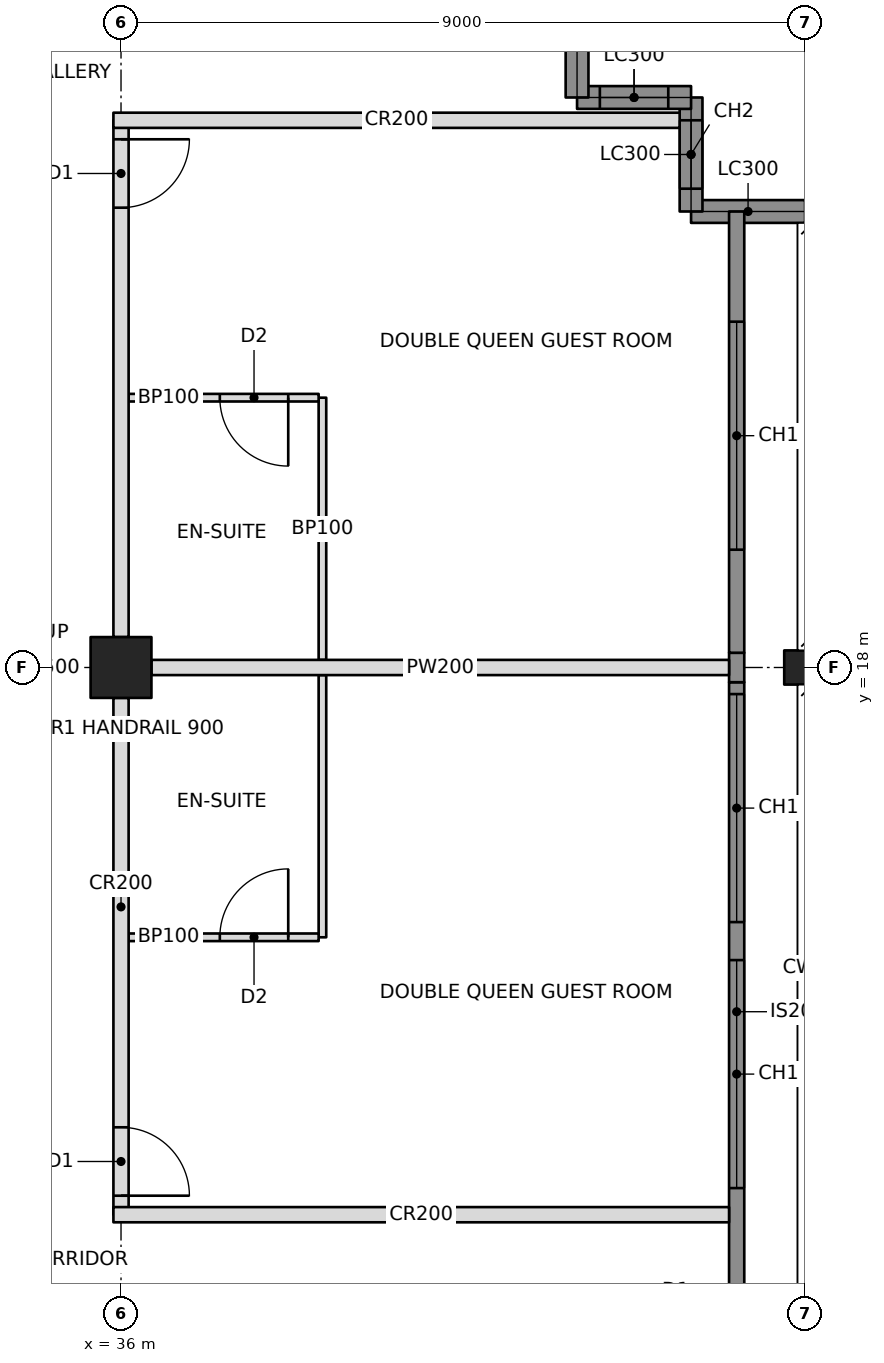
"""IFC4 building model, lengths in metres.
Left out: names, types, materials, properties, quantities, classifications, styles, units other than length and angle.
Written with IfcOpenShell. Run it as: python <this file> out.ifc"""

import sys

from ifc_helpers import new_model, si_unit, direction, frame, frame_2d, origin, origin_2d, place, context, subcontext, project, spatial, rectangle, hollow_rectangle, i_section, extrude, element, fill, save


model = new_model("IFC4")
c1 = context("Model", 3, precision=1e-05, world=origin(), true_north=direction((0.0, 1.0)))
c2 = subcontext(c1, "Body", "Model", "MODEL_VIEW")
j1 = project(units=[si_unit("LENGTHUNIT", "METRE"), si_unit("PLANEANGLEUNIT", "RADIAN")], contexts=[c1])
p1 = place(None, origin())
s1 = spatial("IfcSite", under=j1, at=p1, CompositionType="ELEMENT")
p2 = place(p1, origin())
s2 = spatial("IfcBuilding", under=s1, at=p2, CompositionType="ELEMENT")
p3 = place(p2, frame((0.0, 0.0, 184.2)))
s3 = spatial("IfcBuildingStorey", under=s2, at=p3, CompositionType="ELEMENT", Elevation=184.2)
p4 = place(p3, frame((36.0, 18.0, 0.0), z_axis=(0.0, 0.0, 1.0), x_axis=(0.0, 1.0, 0.0)))
e1 = element("IfcColumn", 1, at=p4, inside=s3, PredefinedType="COLUMN", context=c2, shape_type="SweptSolid", body=[
    extrude(hollow_rectangle(XDim=0.8, YDim=0.8, WallThickness=0.06, at=origin_2d()), origin(), (0.0, 0.0, 1.0), 3.4),
])
p5 = place(p3, frame((45.0, 18.0, 0.0), z_axis=(0.0, 0.0, 1.0), x_axis=(0.0, 1.0, 0.0)))
e2 = element("IfcColumn", 2, at=p5, inside=s3, PredefinedType="COLUMN", context=c2, shape_type="SweptSolid", body=[
    extrude(i_section(OverallWidth=0.449, OverallDepth=0.549, WebThickness=0.072, FlangeThickness=0.115, at=origin_2d()), origin(), (0.0, 0.0, 1.0), 3.4),
])
p6 = place(p3, frame((45.0, 24.0, 0.0), z_axis=(0.0, 0.0, 1.0), x_axis=(-1.0, 0.0, 0.0)))
e3 = element("IfcWall", 3, at=p6, inside=s3, PredefinedType="SOLIDWALL", context=c2, shape_type="SweptSolid", body=[
    extrude(rectangle(XDim=1.5, YDim=0.3, at=frame_2d((0.75, 0.0))), origin(), (0.0, 0.0, 1.0), 2.42),
])
p7 = place(p3, frame((43.5, 24.0, 0.0), z_axis=(0.0, 0.0, 1.0), x_axis=(0.0, 1.0, 0.0)))
e4 = element("IfcWall", 4, at=p7, inside=s3, PredefinedType="SOLIDWALL", context=c2, shape_type="SweptSolid", body=[
    extrude(rectangle(XDim=1.5, YDim=0.3, at=frame_2d((0.75, 0.0))), origin(), (0.0, 0.0, 1.0), 3.2),
])
p8 = place(p7, frame((0.3, 0.0, 0.6)))
e5 = element("IfcOpeningElement", 5, at=p8, cuts=e4, PredefinedType="OPENING", context=c2, shape_type="SweptSolid", body=[
    extrude(rectangle(XDim=0.9, YDim=2.2, at=frame_2d((0.45, 1.1))), frame((0.0, 0.16, 0.0), z_axis=(0.0, -1.0, 0.0), x_axis=(1.0, 0.0, 0.0)), (0.0, 0.0, 1.0), 0.32),
])
p9 = place(p3, frame((43.5, 25.5, 0.0), z_axis=(0.0, 0.0, 1.0), x_axis=(-1.0, 0.0, 0.0)))
e6 = element("IfcWall", 6, at=p9, inside=s3, PredefinedType="SOLIDWALL", context=c2, shape_type="SweptSolid", body=[
    extrude(rectangle(XDim=1.5, YDim=0.3, at=frame_2d((0.75, 0.0))), origin(), (0.0, 0.0, 1.0), 3.2),
])
p10 = place(p9, frame((0.3, 0.0, 0.6)))
e7 = element("IfcOpeningElement", 7, at=p10, cuts=e6, PredefinedType="OPENING", context=c2, shape_type="SweptSolid", body=[
    extrude(rectangle(XDim=0.9, YDim=2.2, at=frame_2d((0.45, 1.1))), frame((0.0, 0.16, 0.0), z_axis=(0.0, -1.0, 0.0), x_axis=(1.0, 0.0, 0.0)), (0.0, 0.0, 1.0), 0.32),
])
p11 = place(p3, frame((42.0, 25.5, 0.0), z_axis=(0.0, 0.0, 1.0), x_axis=(0.0, 1.0, 0.0)))
e8 = element("IfcWall", 8, at=p11, inside=s3, PredefinedType="SOLIDWALL", context=c2, shape_type="SweptSolid", body=[
    extrude(rectangle(XDim=1.5, YDim=0.3, at=frame_2d((0.75, 0.0))), origin(), (0.0, 0.0, 1.0), 2.42),
])
p12 = place(p3, frame((36.0, 10.8, 0.0), z_axis=(0.0, 0.0, 1.0), x_axis=(0.0, 1.0, 0.0)))
e9 = element("IfcWall", 9, at=p12, inside=s3, PredefinedType="PARTITIONING", context=c2, shape_type="SweptSolid", body=[
    extrude(rectangle(XDim=6.8, YDim=0.2, at=frame_2d((3.4, 0.0))), origin(), (0.0, 0.0, 1.0), 2.405),
])
p13 = place(p12, frame((0.25, 0.0, 0.0)))
e10 = element("IfcOpeningElement", 10, at=p13, cuts=e9, PredefinedType="OPENING", context=c2, shape_type="SweptSolid", body=[
    extrude(rectangle(XDim=0.9, YDim=2.1, at=frame_2d((0.45, 1.05))), frame((0.0, 0.11, 0.0), z_axis=(0.0, -1.0, 0.0), x_axis=(1.0, 0.0, 0.0)), (0.0, 0.0, 1.0), 0.22),
])
p14 = place(p3, frame((36.0, 18.4, 0.0), z_axis=(0.0, 0.0, 1.0), x_axis=(0.0, 1.0, 0.0)))
e11 = element("IfcWall", 11, at=p14, inside=s3, PredefinedType="PARTITIONING", context=c2, shape_type="SweptSolid", body=[
    extrude(rectangle(XDim=6.8, YDim=0.2, at=frame_2d((3.4, 0.0))), origin(), (0.0, 0.0, 1.0), 2.405),
])
p15 = place(p14, frame((5.65, 0.0, 0.0)))
e12 = element("IfcOpeningElement", 12, at=p15, cuts=e11, PredefinedType="OPENING", context=c2, shape_type="SweptSolid", body=[
    extrude(rectangle(XDim=0.9, YDim=2.1, at=frame_2d((0.45, 1.05))), frame((0.0, 0.11, 0.0), z_axis=(0.0, -1.0, 0.0), x_axis=(1.0, 0.0, 0.0)), (0.0, 0.0, 1.0), 0.22),
])
p16 = place(p3, frame((35.9, 10.8, 0.0), z_axis=(0.0, 0.0, 1.0), x_axis=(1.0, 0.0, 0.0)))
e13 = element("IfcWall", 13, at=p16, inside=s3, PredefinedType="PARTITIONING", context=c2, shape_type="SweptSolid", body=[
    extrude(rectangle(XDim=8.1, YDim=0.2, at=frame_2d((4.05, 0.0))), origin(), (0.0, 0.0, 1.0), 2.404),
])
p17 = place(p3, frame((35.9, 25.2, 0.0), z_axis=(0.0, 0.0, 1.0), x_axis=(1.0, 0.0, 0.0)))
e14 = element("IfcWall", 14, at=p17, inside=s3, PredefinedType="PARTITIONING", context=c2, shape_type="SweptSolid", body=[
    extrude(rectangle(XDim=7.45, YDim=0.2, at=frame_2d((3.725, 0.0))), origin(), (0.0, 0.0, 1.0), 2.404),
])
p18 = place(p3, frame((36.4, 18.0, 0.0), z_axis=(0.0, 0.0, 1.0), x_axis=(1.0, 0.0, 0.0)))
e15 = element("IfcWall", 15, at=p18, inside=s3, PredefinedType="PARTITIONING", context=c2, shape_type="SweptSolid", body=[
    extrude(rectangle(XDim=7.6, YDim=0.2, at=frame_2d((3.8, 0.0))), origin(), (0.0, 0.0, 1.0), 2.405),
])
p19 = place(p3, frame((38.65, 14.45, 0.0), z_axis=(0.0, 0.0, 1.0), x_axis=(0.0, 1.0, 0.0)))
e16 = element("IfcWall", 16, at=p19, inside=s3, PredefinedType="PARTITIONING", context=c2, shape_type="SweptSolid", body=[
    extrude(rectangle(XDim=3.45, YDim=0.1, at=frame_2d((1.725, 0.0))), origin(), (0.0, 0.0, 1.0), 2.404),
])
p20 = place(p3, frame((36.1, 14.45, 0.0), z_axis=(0.0, 0.0, 1.0), x_axis=(1.0, 0.0, 0.0)))
e17 = element("IfcWall", 17, at=p20, inside=s3, PredefinedType="PARTITIONING", context=c2, shape_type="SweptSolid", body=[
    extrude(rectangle(XDim=2.5, YDim=0.1, at=frame_2d((1.25, 0.0))), origin(), (0.0, 0.0, 1.0), 2.404),
])
p21 = place(p20, frame((1.2, 0.0, 0.0)))
e18 = element("IfcOpeningElement", 18, at=p21, cuts=e17, PredefinedType="OPENING", context=c2, shape_type="SweptSolid", body=[
    extrude(rectangle(XDim=0.9, YDim=2.1, at=frame_2d((0.45, 1.05))), frame((0.0, 0.06, 0.0), z_axis=(0.0, -1.0, 0.0), x_axis=(1.0, 0.0, 0.0)), (0.0, 0.0, 1.0), 0.12),
])
p22 = place(p3, frame((38.65, 18.1, 0.0), z_axis=(0.0, 0.0, 1.0), x_axis=(0.0, 1.0, 0.0)))
e19 = element("IfcWall", 19, at=p22, inside=s3, PredefinedType="PARTITIONING", context=c2, shape_type="SweptSolid", body=[
    extrude(rectangle(XDim=3.45, YDim=0.1, at=frame_2d((1.725, 0.0))), origin(), (0.0, 0.0, 1.0), 2.404),
])
p23 = place(p3, frame((36.1, 21.55, 0.0), z_axis=(0.0, 0.0, 1.0), x_axis=(1.0, 0.0, 0.0)))
e20 = element("IfcWall", 20, at=p23, inside=s3, PredefinedType="PARTITIONING", context=c2, shape_type="SweptSolid", body=[
    extrude(rectangle(XDim=2.5, YDim=0.1, at=frame_2d((1.25, 0.0))), origin(), (0.0, 0.0, 1.0), 2.404),
])
p24 = place(p23, frame((1.2, 0.0, 0.0)))
e21 = element("IfcOpeningElement", 21, at=p24, cuts=e20, PredefinedType="OPENING", context=c2, shape_type="SweptSolid", body=[
    extrude(rectangle(XDim=0.9, YDim=2.1, at=frame_2d((0.45, 1.05))), frame((0.0, 0.06, 0.0), z_axis=(0.0, -1.0, 0.0), x_axis=(1.0, 0.0, 0.0)), (0.0, 0.0, 1.0), 0.12),
])
p25 = place(p3, frame((44.1, 9.135, 0.0), z_axis=(0.0, 0.0, 1.0), x_axis=(0.0, 1.0, 0.0)))
e22 = element("IfcWall", 22, at=p25, inside=s3, PredefinedType="SOLIDWALL", context=c2, shape_type="SweptSolid", body=[
    extrude(rectangle(XDim=8.671, YDim=0.2, at=frame_2d((4.335, 0.0))), origin(), (0.0, 0.0, 1.0), 3.2),
])
p26 = place(p25, frame((2.015, 0.0, 0.6)))
e23 = element("IfcOpeningElement", 23, at=p26, cuts=e22, PredefinedType="OPENING", context=c2, shape_type="SweptSolid", body=[
    extrude(rectangle(XDim=3.0, YDim=2.2, at=frame_2d((1.5, 1.1))), frame((0.0, 0.11, 0.0), z_axis=(0.0, -1.0, 0.0), x_axis=(1.0, 0.0, 0.0)), (0.0, 0.0, 1.0), 0.22),
])
p27 = place(p25, frame((5.515, 0.0, 0.6)))
e24 = element("IfcOpeningElement", 24, at=p27, cuts=e22, PredefinedType="OPENING", context=c2, shape_type="SweptSolid", body=[
    extrude(rectangle(XDim=3.0, YDim=2.2, at=frame_2d((1.5, 1.1))), frame((0.0, 0.11, 0.0), z_axis=(0.0, -1.0, 0.0), x_axis=(1.0, 0.0, 0.0)), (0.0, 0.0, 1.0), 0.22),
])
p28 = place(p3, frame((44.1, 17.806, 0.0), z_axis=(0.0, 0.0, 1.0), x_axis=(0.0, 1.0, 0.0)))
e25 = element("IfcWall", 25, at=p28, inside=s3, PredefinedType="SOLIDWALL", context=c2, shape_type="SweptSolid", body=[
    extrude(rectangle(XDim=0.388, YDim=0.2, at=frame_2d((0.194, 0.0))), origin(), (0.0, 0.0, 1.0), 2.404),
])
p29 = place(p3, frame((44.1, 18.194, 0.0), z_axis=(0.0, 0.0, 1.0), x_axis=(0.0, 1.0, 0.0)))
e26 = element("IfcWall", 26, at=p29, inside=s3, PredefinedType="SOLIDWALL", context=c2, shape_type="SweptSolid", body=[
    extrude(rectangle(XDim=5.806, YDim=0.2, at=frame_2d((2.903, 0.0))), origin(), (0.0, 0.0, 1.0), 3.2),
])
p30 = place(p29, frame((1.356, 0.0, 0.6)))
e27 = element("IfcOpeningElement", 27, at=p30, cuts=e26, PredefinedType="OPENING", context=c2, shape_type="SweptSolid", body=[
    extrude(rectangle(XDim=3.0, YDim=2.2, at=frame_2d((1.5, 1.1))), frame((0.0, 0.11, 0.0), z_axis=(0.0, -1.0, 0.0), x_axis=(1.0, 0.0, 0.0)), (0.0, 0.0, 1.0), 0.22),
])
p31 = place(p8, origin())
e28 = element("IfcWindow", 28, at=p31, inside=s3, PartitioningType="SINGLE_PANEL", PredefinedType="WINDOW", context=c2, shape_type="SweptSolid", body=[
    extrude(rectangle(XDim=0.9, YDim=2.2, at=frame_2d((0.45, 1.1))), frame((0.0, 0.03, 0.0), z_axis=(0.0, -1.0, 0.0), x_axis=(1.0, 0.0, 0.0)), (0.0, 0.0, 1.0), 0.06),
])
fill(e5, e28)
p32 = place(p10, origin())
e29 = element("IfcWindow", 29, at=p32, inside=s3, PartitioningType="SINGLE_PANEL", PredefinedType="WINDOW", context=c2, shape_type="SweptSolid", body=[
    extrude(rectangle(XDim=0.9, YDim=2.2, at=frame_2d((0.45, 1.1))), frame((0.0, 0.03, 0.0), z_axis=(0.0, -1.0, 0.0), x_axis=(1.0, 0.0, 0.0)), (0.0, 0.0, 1.0), 0.06),
])
fill(e7, e29)
p33 = place(p26, origin())
e30 = element("IfcWindow", 30, at=p33, inside=s3, PartitioningType="TRIPLE_PANEL_VERTICAL", PredefinedType="WINDOW", context=c2, shape_type="SweptSolid", body=[
    extrude(rectangle(XDim=3.0, YDim=2.2, at=frame_2d((1.5, 1.1))), frame((0.0, 0.03, 0.0), z_axis=(0.0, -1.0, 0.0), x_axis=(1.0, 0.0, 0.0)), (0.0, 0.0, 1.0), 0.06),
])
fill(e23, e30)
p34 = place(p27, origin())
e31 = element("IfcWindow", 31, at=p34, inside=s3, PartitioningType="TRIPLE_PANEL_VERTICAL", PredefinedType="WINDOW", context=c2, shape_type="SweptSolid", body=[
    extrude(rectangle(XDim=3.0, YDim=2.2, at=frame_2d((1.5, 1.1))), frame((0.0, 0.03, 0.0), z_axis=(0.0, -1.0, 0.0), x_axis=(1.0, 0.0, 0.0)), (0.0, 0.0, 1.0), 0.06),
])
fill(e24, e31)
p35 = place(p30, origin())
e32 = element("IfcWindow", 32, at=p35, inside=s3, PartitioningType="TRIPLE_PANEL_VERTICAL", PredefinedType="WINDOW", context=c2, shape_type="SweptSolid", body=[
    extrude(rectangle(XDim=3.0, YDim=2.2, at=frame_2d((1.5, 1.1))), frame((0.0, 0.03, 0.0), z_axis=(0.0, -1.0, 0.0), x_axis=(1.0, 0.0, 0.0)), (0.0, 0.0, 1.0), 0.06),
])
fill(e27, e32)
p36 = place(p21, origin())
e33 = element("IfcDoor", 33, at=p36, inside=s3, OperationType="SINGLE_SWING_RIGHT", PredefinedType="DOOR", context=c2, shape_type="SweptSolid", body=[
    extrude(rectangle(XDim=0.9, YDim=2.1, at=frame_2d((0.45, 1.05))), frame((0.0, 0.025, 0.0), z_axis=(0.0, -1.0, 0.0), x_axis=(1.0, 0.0, 0.0)), (0.0, 0.0, 1.0), 0.05),
])
fill(e18, e33)
p37 = place(p13, frame((0.9, 0.0, 0.0), z_axis=(0.0, 0.0, 1.0), x_axis=(-1.0, 0.0, 0.0)))
e34 = element("IfcDoor", 34, at=p37, inside=s3, OperationType="SINGLE_SWING_RIGHT", PredefinedType="DOOR", context=c2, shape_type="SweptSolid", body=[
    extrude(rectangle(XDim=0.9, YDim=2.1, at=frame_2d((0.45, 1.05))), frame((0.0, 0.025, 0.0), z_axis=(0.0, -1.0, 0.0), x_axis=(1.0, 0.0, 0.0)), (0.0, 0.0, 1.0), 0.05),
])
fill(e10, e34)
p38 = place(p24, frame((0.9, 0.0, 0.0), z_axis=(0.0, 0.0, 1.0), x_axis=(-1.0, 0.0, 0.0)))
e35 = element("IfcDoor", 35, at=p38, inside=s3, OperationType="SINGLE_SWING_LEFT", PredefinedType="DOOR", context=c2, shape_type="SweptSolid", body=[
    extrude(rectangle(XDim=0.9, YDim=2.1, at=frame_2d((0.45, 1.05))), frame((0.0, 0.025, 0.0), z_axis=(0.0, -1.0, 0.0), x_axis=(1.0, 0.0, 0.0)), (0.0, 0.0, 1.0), 0.05),
])
fill(e21, e35)
p39 = place(p15, frame((0.9, 0.0, 0.0), z_axis=(0.0, 0.0, 1.0), x_axis=(-1.0, 0.0, 0.0)))
e36 = element("IfcDoor", 36, at=p39, inside=s3, OperationType="SINGLE_SWING_LEFT", PredefinedType="DOOR", context=c2, shape_type="SweptSolid", body=[
    extrude(rectangle(XDim=0.9, YDim=2.1, at=frame_2d((0.45, 1.05))), frame((0.0, 0.025, 0.0), z_axis=(0.0, -1.0, 0.0), x_axis=(1.0, 0.0, 0.0)), (0.0, 0.0, 1.0), 0.05),
])
fill(e12, e36)
save(model, sys.argv[1])
